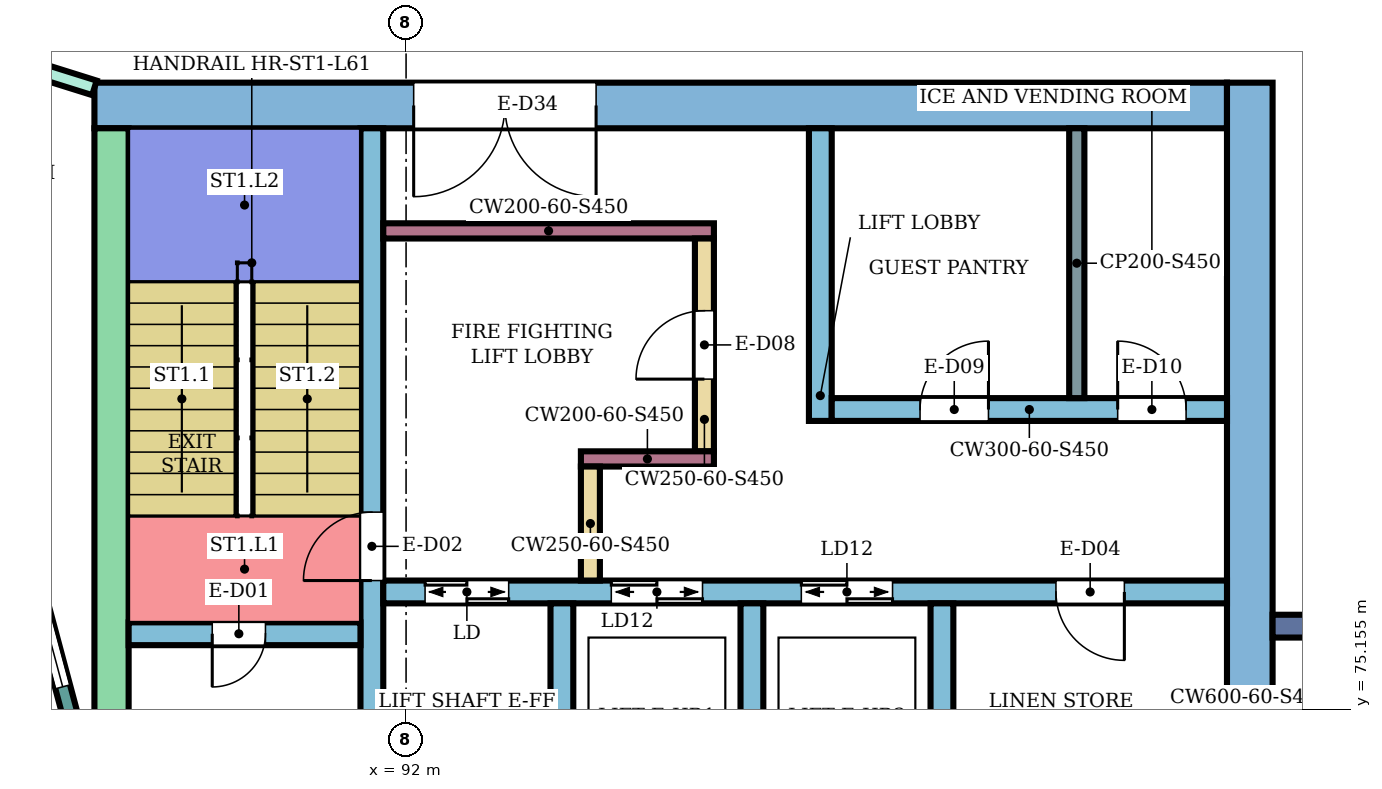
"""IFC4 building model, lengths in metres.
Left out: names, types, materials, properties, quantities, classifications, styles, units other than length and angle.
Written with IfcOpenShell. Run it as: python <this file> out.ifc"""

import sys

from ifc_helpers import new_model, si_unit, direction, frame, frame_2d, origin, place, context, subcontext, project, spatial, rectangle, extrude, element, fill, save


model = new_model("IFC4")
c1 = context("Model", 3, precision=1e-05, world=origin(), true_north=direction((0.0, 1.0)))
c2 = subcontext(c1, "Body", "Model", "MODEL_VIEW")
j1 = project(units=[si_unit("LENGTHUNIT", "METRE"), si_unit("PLANEANGLEUNIT", "RADIAN")], contexts=[c1])
p1 = place(None, origin())
s1 = spatial("IfcSite", under=j1, at=p1, CompositionType="ELEMENT")
p2 = place(p1, origin())
s2 = spatial("IfcBuilding", under=s1, at=p2, CompositionType="ELEMENT")
p3 = place(p2, frame((0.0, 0.0, 266.7)))
s3 = spatial("IfcBuildingStorey", under=s2, at=p3, CompositionType="ELEMENT", Elevation=266.7)
p4 = place(p3, frame((87.9, 83.1, 0.0), z_axis=(0.0, 0.0, 1.0), x_axis=(1.0, 0.0, 0.0)))
e1 = element("IfcWall", 1, at=p4, inside=s3, PredefinedType="SHEAR", context=c2, shape_type="SweptSolid", body=[
    extrude(rectangle(XDim=14.9, YDim=0.6, at=frame_2d((7.45, 0.0))), origin(), (0.0, 0.0, 1.0), 3.75),
])
p5 = place(p4, frame((4.2, 0.0, 0.0)))
e2 = element("IfcOpeningElement", 2, at=p5, cuts=e1, PredefinedType="OPENING", context=c2, shape_type="SweptSolid", body=[
    extrude(rectangle(XDim=2.4, YDim=2.4, at=frame_2d((1.2, 1.2))), frame((0.0, 0.31, 0.0), z_axis=(0.0, -1.0, 0.0), x_axis=(1.0, 0.0, 0.0)), (0.0, 0.0, 1.0), 0.62),
])
p6 = place(p3, frame((88.125, 75.0, 0.0), z_axis=(0.0, 0.0, 1.0), x_axis=(0.0, 1.0, 0.0)))
e3 = element("IfcWall", 3, at=p6, inside=s3, PredefinedType="SHEAR", context=c2, shape_type="SweptSolid", body=[
    extrude(rectangle(XDim=7.8, YDim=0.45, at=frame_2d((3.9, 0.0))), origin(), (0.0, 0.0, 1.0), 3.75),
])
p7 = place(p3, frame((103.1, 66.6, 0.0), z_axis=(0.0, 0.0, 1.0), x_axis=(0.0, 1.0, 0.0)))
e4 = element("IfcWall", 4, at=p7, inside=s3, PredefinedType="SHEAR", context=c2, shape_type="SweptSolid", body=[
    extrude(rectangle(XDim=16.8, YDim=0.6, at=frame_2d((8.4, 0.0))), origin(), (0.0, 0.0, 1.0), 3.75),
])
p8 = place(p3, frame((91.55, 75.0, 0.0), z_axis=(0.0, 0.0, 1.0), x_axis=(0.0, 1.0, 0.0)))
e5 = element("IfcWall", 5, at=p8, inside=s3, PredefinedType="SHEAR", context=c2, shape_type="SweptSolid", body=[
    extrude(rectangle(XDim=7.8, YDim=0.3, at=frame_2d((3.9, 0.0))), origin(), (0.0, 0.0, 1.0), 3.75),
])
p9 = place(p8, frame((1.85, 0.0, 0.0)))
e6 = element("IfcOpeningElement", 6, at=p9, cuts=e5, PredefinedType="OPENING", context=c2, shape_type="SweptSolid", body=[
    extrude(rectangle(XDim=0.9, YDim=2.1, at=frame_2d((0.45, 1.05))), frame((0.0, 0.16, 0.0), z_axis=(0.0, -1.0, 0.0), x_axis=(1.0, 0.0, 0.0)), (0.0, 0.0, 1.0), 0.32),
])
p10 = place(p3, frame((88.35, 76.15, 0.0), z_axis=(0.0, 0.0, 1.0), x_axis=(1.0, 0.0, 0.0)))
e7 = element("IfcWall", 7, at=p10, inside=s3, PredefinedType="SHEAR", context=c2, shape_type="SweptSolid", body=[
    extrude(rectangle(XDim=3.05, YDim=0.3, at=frame_2d((1.525, 0.0))), origin(), (0.0, 0.0, 1.0), 3.75),
])
p11 = place(p10, frame((1.1, 0.0, 0.0)))
e8 = element("IfcOpeningElement", 8, at=p11, cuts=e7, PredefinedType="OPENING", context=c2, shape_type="SweptSolid", body=[
    extrude(rectangle(XDim=0.7, YDim=2.0, at=frame_2d((0.35, 1.0))), frame((0.0, 0.16, 0.0), z_axis=(0.0, -1.0, 0.0), x_axis=(1.0, 0.0, 0.0)), (0.0, 0.0, 1.0), 0.32),
])
p12 = place(p3, frame((91.7, 76.7, 0.0), z_axis=(0.0, 0.0, 1.0), x_axis=(1.0, 0.0, 0.0)))
e9 = element("IfcWall", 9, at=p12, inside=s3, PredefinedType="SHEAR", context=c2, shape_type="SweptSolid", body=[
    extrude(rectangle(XDim=11.1, YDim=0.3, at=frame_2d((5.55, 0.0))), origin(), (0.0, 0.0, 1.0), 3.75),
])
p13 = place(p12, frame((0.55, 0.0, 0.0)))
e10 = element("IfcOpeningElement", 10, at=p13, cuts=e9, PredefinedType="OPENING", context=c2, shape_type="SweptSolid", body=[
    extrude(rectangle(XDim=1.1, YDim=2.1, at=frame_2d((0.55, 1.05))), frame((0.0, 0.16, 0.0), z_axis=(0.0, -1.0, 0.0), x_axis=(1.0, 0.0, 0.0)), (0.0, 0.0, 1.0), 0.32),
])
p14 = place(p12, frame((3.0, 0.0, 0.0)))
e11 = element("IfcOpeningElement", 11, at=p14, cuts=e9, PredefinedType="OPENING", context=c2, shape_type="SweptSolid", body=[
    extrude(rectangle(XDim=1.2, YDim=2.1, at=frame_2d((0.6, 1.05))), frame((0.0, 0.16, 0.0), z_axis=(0.0, -1.0, 0.0), x_axis=(1.0, 0.0, 0.0)), (0.0, 0.0, 1.0), 0.32),
])
p15 = place(p12, frame((5.5, 0.0, 0.0)))
e12 = element("IfcOpeningElement", 12, at=p15, cuts=e9, PredefinedType="OPENING", context=c2, shape_type="SweptSolid", body=[
    extrude(rectangle(XDim=1.2, YDim=2.1, at=frame_2d((0.6, 1.05))), frame((0.0, 0.16, 0.0), z_axis=(0.0, -1.0, 0.0), x_axis=(1.0, 0.0, 0.0)), (0.0, 0.0, 1.0), 0.32),
])
p16 = place(p12, frame((8.85, 0.0, 0.0)))
e13 = element("IfcOpeningElement", 13, at=p16, cuts=e9, PredefinedType="OPENING", context=c2, shape_type="SweptSolid", body=[
    extrude(rectangle(XDim=0.9, YDim=2.1, at=frame_2d((0.45, 1.05))), frame((0.0, 0.16, 0.0), z_axis=(0.0, -1.0, 0.0), x_axis=(1.0, 0.0, 0.0)), (0.0, 0.0, 1.0), 0.32),
])
for number, where, z_axis, x_axis in (
    (14, (94.05, 74.0, 0.0), (0.0, 0.0, 1.0), (0.0, 1.0, 0.0)),
    (15, (96.55, 74.0, 0.0), (0.0, 0.0, 1.0), (0.0, 1.0, 0.0)),
    (16, (99.05, 74.0, 0.0), (0.0, 0.0, 1.0), (0.0, 1.0, 0.0)),
):
    element("IfcWall", number, at=place(p3, frame(where, z_axis=z_axis, x_axis=x_axis)), inside=s3, PredefinedType="SHEAR", context=c2, shape_type="SweptSolid", body=[
        extrude(rectangle(XDim=2.55, YDim=0.3, at=frame_2d((1.275, 0.0))), origin(), (0.0, 0.0, 1.0), 3.75),
    ])
p17 = place(p3, frame((91.7, 81.45, 0.0), z_axis=(0.0, 0.0, 1.0), x_axis=(1.0, 0.0, 0.0)))
e17 = element("IfcWall", 17, at=p17, inside=s3, PredefinedType="SHEAR", context=c2, shape_type="SweptSolid", body=[
    extrude(rectangle(XDim=4.35, YDim=0.2, at=frame_2d((2.175, 0.0))), origin(), (0.0, 0.0, 1.0), 3.75),
])
p18 = place(p3, frame((95.925, 78.55, 0.0), z_axis=(0.0, 0.0, 1.0), x_axis=(0.0, 1.0, 0.0)))
e18 = element("IfcWall", 18, at=p18, inside=s3, PredefinedType="SHEAR", context=c2, shape_type="SweptSolid", body=[
    extrude(rectangle(XDim=2.8, YDim=0.25, at=frame_2d((1.4, 0.0))), origin(), (0.0, 0.0, 1.0), 3.75),
])
p19 = place(p18, frame((0.95, 0.0, 0.0)))
e19 = element("IfcOpeningElement", 19, at=p19, cuts=e18, PredefinedType="OPENING", context=c2, shape_type="SweptSolid", body=[
    extrude(rectangle(XDim=0.9, YDim=2.1, at=frame_2d((0.45, 1.05))), frame((0.0, 0.135, 0.0), z_axis=(0.0, -1.0, 0.0), x_axis=(1.0, 0.0, 0.0)), (0.0, 0.0, 1.0), 0.27),
])
p20 = place(p3, frame((94.3, 78.45, 0.0), z_axis=(0.0, 0.0, 1.0), x_axis=(1.0, 0.0, 0.0)))
e20 = element("IfcWall", 20, at=p20, inside=s3, PredefinedType="SHEAR", context=c2, shape_type="SweptSolid", body=[
    extrude(rectangle(XDim=1.75, YDim=0.2, at=frame_2d((0.875, 0.0))), origin(), (0.0, 0.0, 1.0), 3.75),
])
p21 = place(p3, frame((94.425, 76.85, 0.0), z_axis=(0.0, 0.0, 1.0), x_axis=(0.0, 1.0, 0.0)))
e21 = element("IfcWall", 21, at=p21, inside=s3, PredefinedType="SHEAR", context=c2, shape_type="SweptSolid", body=[
    extrude(rectangle(XDim=1.5, YDim=0.25, at=frame_2d((0.75, 0.0))), origin(), (0.0, 0.0, 1.0), 3.75),
])
p22 = place(p3, frame((97.45, 78.95, 0.0), z_axis=(0.0, 0.0, 1.0), x_axis=(0.0, 1.0, 0.0)))
e22 = element("IfcWall", 22, at=p22, inside=s3, PredefinedType="SHEAR", context=c2, shape_type="SweptSolid", body=[
    extrude(rectangle(XDim=3.85, YDim=0.3, at=frame_2d((1.925, 0.0))), origin(), (0.0, 0.0, 1.0), 3.75),
])
p23 = place(p3, frame((97.6, 79.1, 0.0), z_axis=(0.0, 0.0, 1.0), x_axis=(1.0, 0.0, 0.0)))
e23 = element("IfcWall", 23, at=p23, inside=s3, PredefinedType="SHEAR", context=c2, shape_type="SweptSolid", body=[
    extrude(rectangle(XDim=5.2, YDim=0.3, at=frame_2d((2.6, 0.0))), origin(), (0.0, 0.0, 1.0), 3.75),
])
p24 = place(p23, frame((1.162, 0.0, 0.0)))
e24 = element("IfcOpeningElement", 24, at=p24, cuts=e23, PredefinedType="OPENING", context=c2, shape_type="SweptSolid", body=[
    extrude(rectangle(XDim=0.9, YDim=2.1, at=frame_2d((0.45, 1.05))), frame((0.0, 0.16, 0.0), z_axis=(0.0, -1.0, 0.0), x_axis=(1.0, 0.0, 0.0)), (0.0, 0.0, 1.0), 0.32),
])
p25 = place(p23, frame((3.762, 0.0, 0.0)))
e25 = element("IfcOpeningElement", 25, at=p25, cuts=e23, PredefinedType="OPENING", context=c2, shape_type="SweptSolid", body=[
    extrude(rectangle(XDim=0.9, YDim=2.1, at=frame_2d((0.45, 1.05))), frame((0.0, 0.16, 0.0), z_axis=(0.0, -1.0, 0.0), x_axis=(1.0, 0.0, 0.0)), (0.0, 0.0, 1.0), 0.32),
])
p26 = place(p3, frame((103.4, 76.25, 0.0), z_axis=(0.0, 0.0, 1.0), x_axis=(1.0, 0.0, 0.0)))
e26 = element("IfcWall", 26, at=p26, inside=s3, PredefinedType="NOTDEFINED", context=c2, shape_type="SweptSolid", body=[
    extrude(rectangle(XDim=2.416, YDim=0.3, at=frame_2d((1.208, 0.0))), origin(), (0.0, 0.0, 1.0), 4.2),
])
p27 = place(p3, frame((87.604, 75.0, 0.0), z_axis=(0.0, 0.0, 1.0), x_axis=(-0.258789828301, 0.965933654434, 0.0)))
e27 = element("IfcWall", 27, at=p27, inside=s3, PredefinedType="NOTDEFINED", context=c2, shape_type="SweptSolid", body=[
    extrude(rectangle(XDim=3.936, YDim=0.2, at=frame_2d((1.968, 0.0))), origin(), (0.0, 0.0, 1.0), 4.2),
])
p28 = place(p27, frame((0.468, 0.0, 0.9)))
e28 = element("IfcOpeningElement", 28, at=p28, cuts=e27, PredefinedType="OPENING", context=c2, shape_type="SweptSolid", body=[
    extrude(rectangle(XDim=3.0, YDim=2.3, at=frame_2d((1.5, 1.15))), frame((0.0, 0.11, 0.0), z_axis=(0.0, -1.0, 0.0), x_axis=(1.0, 0.0, 0.0)), (0.0, 0.0, 1.0), 0.22),
])
p29 = place(p3, frame((85.587, 84.057, 0.0), z_axis=(0.0, 0.0, 1.0), x_axis=(0.954210767728, -0.299135104513, 0.0)))
e29 = element("IfcWall", 29, at=p29, inside=s3, PredefinedType="PARTITIONING", context=c2, shape_type="SweptSolid", body=[
    extrude(rectangle(XDim=2.424, YDim=0.2, at=frame_2d((1.212, 0.0))), origin(), (0.0, 0.0, 1.0), 3.75),
])
p30 = place(p3, frame((100.824, 79.25, 0.0), z_axis=(0.0, 0.0, 1.0), x_axis=(0.0, 1.0, 0.0)))
e30 = element("IfcWall", 30, at=p30, inside=s3, PredefinedType="PARTITIONING", context=c2, shape_type="SweptSolid", body=[
    extrude(rectangle(XDim=3.55, YDim=0.2, at=frame_2d((1.775, 0.0))), origin(), (0.0, 0.0, 1.0), 3.75),
])
p31 = place(p28, origin())
e31 = element("IfcWindow", 31, at=p31, inside=s3, PartitioningType="SINGLE_PANEL", PredefinedType="WINDOW", context=c2, shape_type="SweptSolid", body=[
    extrude(rectangle(XDim=3.0, YDim=2.3, at=frame_2d((1.5, 1.15))), frame((0.0, 0.03, 0.0), z_axis=(0.0, -1.0, 0.0), x_axis=(1.0, 0.0, 0.0)), (0.0, 0.0, 1.0), 0.06),
])
fill(e28, e31)
p32 = place(p11, frame((0.7, 0.0, 0.0), z_axis=(0.0, 0.0, 1.0), x_axis=(-1.0, 0.0, 0.0)))
e32 = element("IfcDoor", 32, at=p32, inside=s3, OperationType="SINGLE_SWING_RIGHT", PredefinedType="DOOR", context=c2, shape_type="SweptSolid", body=[
    extrude(rectangle(XDim=0.7, YDim=2.0, at=frame_2d((0.35, 1.0))), frame((0.0, 0.025, 0.0), z_axis=(0.0, -1.0, 0.0), x_axis=(1.0, 0.0, 0.0)), (0.0, 0.0, 1.0), 0.05),
])
fill(e8, e32)
p33 = place(p9, origin())
e33 = element("IfcDoor", 33, at=p33, inside=s3, OperationType="SINGLE_SWING_LEFT", PredefinedType="DOOR", context=c2, shape_type="SweptSolid", body=[
    extrude(rectangle(XDim=0.9, YDim=2.1, at=frame_2d((0.45, 1.05))), frame((0.0, 0.025, 0.0), z_axis=(0.0, -1.0, 0.0), x_axis=(1.0, 0.0, 0.0)), (0.0, 0.0, 1.0), 0.05),
])
fill(e6, e33)
p34 = place(p13, origin())
e34 = element("IfcDoor", 34, at=p34, inside=s3, OperationType="DOUBLE_DOOR_SLIDING", PredefinedType="DOOR", context=c2, shape_type="SweptSolid", body=[
    extrude(rectangle(XDim=1.1, YDim=2.1, at=frame_2d((0.55, 1.05))), frame((0.0, 0.025, 0.0), z_axis=(0.0, -1.0, 0.0), x_axis=(1.0, 0.0, 0.0)), (0.0, 0.0, 1.0), 0.05),
])
fill(e10, e34)
p35 = place(p14, origin())
e35 = element("IfcDoor", 35, at=p35, inside=s3, OperationType="DOUBLE_DOOR_SLIDING", PredefinedType="DOOR", context=c2, shape_type="SweptSolid", body=[
    extrude(rectangle(XDim=1.2, YDim=2.1, at=frame_2d((0.6, 1.05))), frame((0.0, 0.025, 0.0), z_axis=(0.0, -1.0, 0.0), x_axis=(1.0, 0.0, 0.0)), (0.0, 0.0, 1.0), 0.05),
])
fill(e11, e35)
p36 = place(p15, origin())
e36 = element("IfcDoor", 36, at=p36, inside=s3, OperationType="DOUBLE_DOOR_SLIDING", PredefinedType="DOOR", context=c2, shape_type="SweptSolid", body=[
    extrude(rectangle(XDim=1.2, YDim=2.1, at=frame_2d((0.6, 1.05))), frame((0.0, 0.025, 0.0), z_axis=(0.0, -1.0, 0.0), x_axis=(1.0, 0.0, 0.0)), (0.0, 0.0, 1.0), 0.05),
])
fill(e12, e36)
p37 = place(p16, frame((0.9, 0.0, 0.0), z_axis=(0.0, 0.0, 1.0), x_axis=(-1.0, 0.0, 0.0)))
e37 = element("IfcDoor", 37, at=p37, inside=s3, OperationType="SINGLE_SWING_LEFT", PredefinedType="DOOR", context=c2, shape_type="SweptSolid", body=[
    extrude(rectangle(XDim=0.9, YDim=2.1, at=frame_2d((0.45, 1.05))), frame((0.0, 0.025, 0.0), z_axis=(0.0, -1.0, 0.0), x_axis=(1.0, 0.0, 0.0)), (0.0, 0.0, 1.0), 0.05),
])
fill(e13, e37)
p38 = place(p19, origin())
e38 = element("IfcDoor", 38, at=p38, inside=s3, OperationType="SINGLE_SWING_LEFT", PredefinedType="DOOR", context=c2, shape_type="SweptSolid", body=[
    extrude(rectangle(XDim=0.9, YDim=2.1, at=frame_2d((0.45, 1.05))), frame((0.0, 0.025, 0.0), z_axis=(0.0, -1.0, 0.0), x_axis=(1.0, 0.0, 0.0)), (0.0, 0.0, 1.0), 0.05),
])
fill(e19, e38)
p39 = place(p24, origin())
e39 = element("IfcDoor", 39, at=p39, inside=s3, OperationType="SINGLE_SWING_RIGHT", PredefinedType="DOOR", context=c2, shape_type="SweptSolid", body=[
    extrude(rectangle(XDim=0.9, YDim=2.1, at=frame_2d((0.45, 1.05))), frame((0.0, 0.025, 0.0), z_axis=(0.0, -1.0, 0.0), x_axis=(1.0, 0.0, 0.0)), (0.0, 0.0, 1.0), 0.05),
])
fill(e24, e39)
p40 = place(p25, origin())
e40 = element("IfcDoor", 40, at=p40, inside=s3, OperationType="SINGLE_SWING_LEFT", PredefinedType="DOOR", context=c2, shape_type="SweptSolid", body=[
    extrude(rectangle(XDim=0.9, YDim=2.1, at=frame_2d((0.45, 1.05))), frame((0.0, 0.025, 0.0), z_axis=(0.0, -1.0, 0.0), x_axis=(1.0, 0.0, 0.0)), (0.0, 0.0, 1.0), 0.05),
])
fill(e25, e40)
p41 = place(p5, frame((2.4, 0.0, 0.0), z_axis=(0.0, 0.0, 1.0), x_axis=(-1.0, 0.0, 0.0)))
e41 = element("IfcDoor", 41, at=p41, inside=s3, OperationType="DOUBLE_DOOR_SINGLE_SWING", PredefinedType="DOOR", context=c2, shape_type="SweptSolid", body=[
    extrude(rectangle(XDim=2.4, YDim=2.4, at=frame_2d((1.2, 1.2))), frame((0.0, 0.025, 0.0), z_axis=(0.0, -1.0, 0.0), x_axis=(1.0, 0.0, 0.0)), (0.0, 0.0, 1.0), 0.05),
])
fill(e2, e41)
save(model, sys.argv[1])
